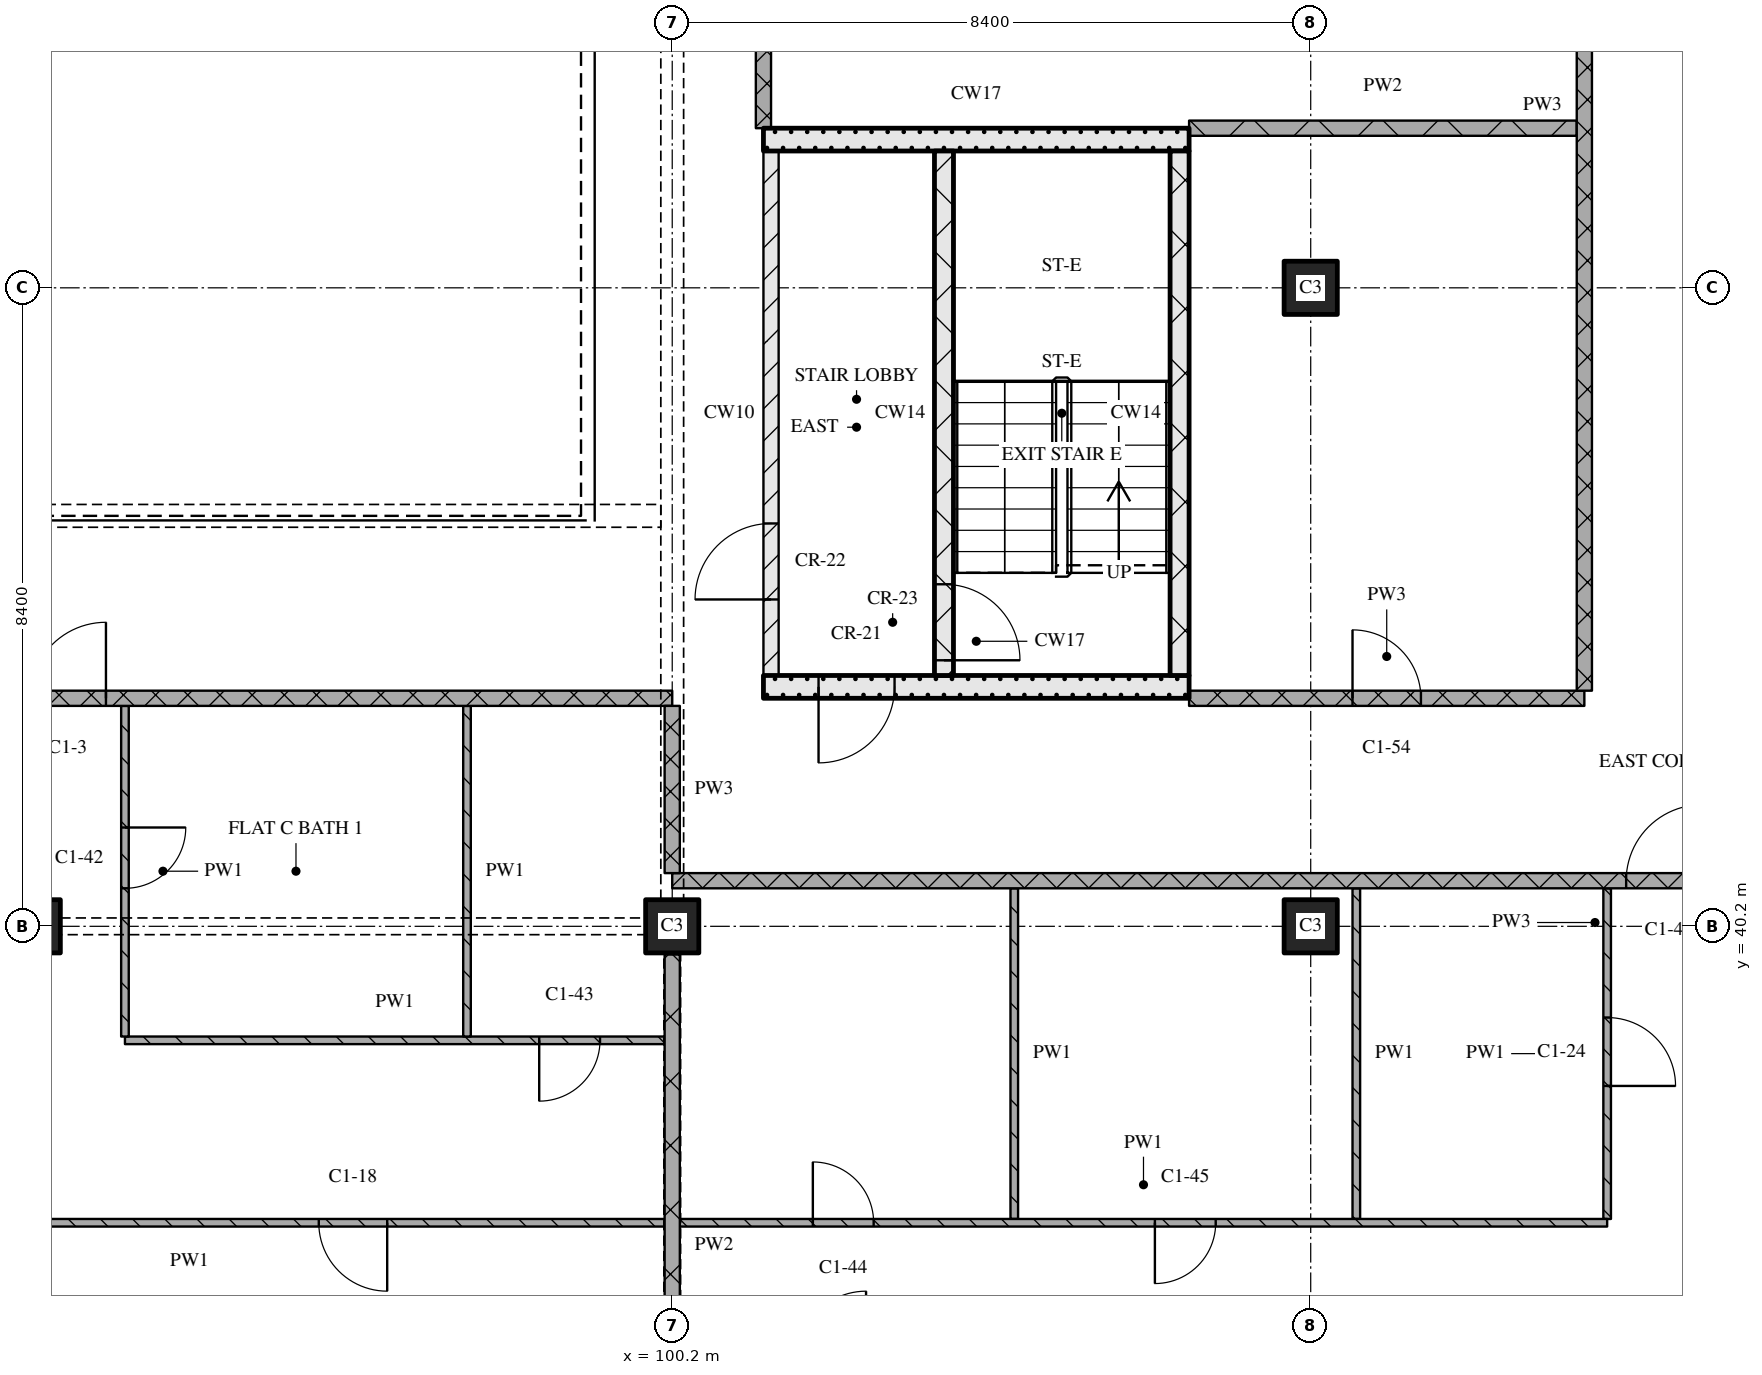
"""IFC4 building model, lengths in metres.
Left out: names, types, materials, properties, quantities, classifications, styles, units other than length and angle.
Written with IfcOpenShell. Run it as: python <this file> out.ifc"""

import sys

from ifc_helpers import new_model, si_unit, direction, frame, frame_2d, origin, origin_2d, place, context, subcontext, project, spatial, rectangle, extrude, element, fill, save


model = new_model("IFC4")
c1 = context("Model", 3, precision=1e-05, world=origin(), true_north=direction((0.0, 1.0)))
c2 = subcontext(c1, "Body", "Model", "MODEL_VIEW")
j1 = project(units=[si_unit("LENGTHUNIT", "METRE"), si_unit("PLANEANGLEUNIT", "RADIAN")], contexts=[c1])
p1 = place(None, origin())
s1 = spatial("IfcSite", under=j1, at=p1, CompositionType="ELEMENT")
p2 = place(p1, origin())
s2 = spatial("IfcBuilding", under=s1, at=p2, CompositionType="ELEMENT")
p3 = place(p2, frame((0.0, 0.0, 147.45)))
s3 = spatial("IfcBuildingStorey", under=s2, at=p3, CompositionType="ELEMENT", Elevation=147.45)
for number, where, z_axis, x_axis in (
    (1, (91.8, 40.2, 0.0), (0.0, 0.0, 1.0), (1.0, 0.0, 0.0)),
    (2, (100.2, 40.2, 0.0), (0.0, 0.0, 1.0), (1.0, 0.0, 0.0)),
    (3, (108.6, 40.2, 0.0), (0.0, 0.0, 1.0), (1.0, 0.0, 0.0)),
    (4, (108.6, 48.6, 0.0), (0.0, 0.0, 1.0), (1.0, 0.0, 0.0)),
):
    element("IfcColumn", number, at=place(p3, frame(where, z_axis=z_axis, x_axis=x_axis)), inside=s3, PredefinedType="COLUMN", context=c2, shape_type="SweptSolid", body=[
        extrude(rectangle(XDim=0.7, YDim=0.7, at=origin_2d()), origin(), (0.0, 0.0, 1.0), 3.6),
    ])
p4 = place(p3, frame((101.4, 43.35, 0.0), z_axis=(0.0, 0.0, 1.0), x_axis=(1.0, 0.0, 0.0)))
e5 = element("IfcWall", 5, at=p4, inside=s3, PredefinedType="SOLIDWALL", context=c2, shape_type="SweptSolid", body=[
    extrude(rectangle(XDim=5.6, YDim=0.3, at=frame_2d((2.8, 0.0))), origin(), (0.0, 0.0, 1.0), 3.32),
])
p5 = place(p4, frame((0.725, 0.0, 0.0)))
e6 = element("IfcOpeningElement", 6, at=p5, cuts=e5, PredefinedType="OPENING", context=c2, shape_type="SweptSolid", body=[
    extrude(rectangle(XDim=1.0, YDim=2.1, at=frame_2d((0.5, 1.05))), frame((0.0, 0.16, 0.0), z_axis=(0.0, -1.0, 0.0), x_axis=(1.0, 0.0, 0.0)), (0.0, 0.0, 1.0), 0.32),
])
p6 = place(p3, frame((101.5, 43.5, 0.0), z_axis=(0.0, 0.0, 1.0), x_axis=(0.0, 1.0, 0.0)))
e7 = element("IfcWall", 7, at=p6, inside=s3, PredefinedType="PARTITIONING", context=c2, shape_type="SweptSolid", body=[
    extrude(rectangle(XDim=6.9, YDim=0.2, at=frame_2d((3.45, 0.0))), origin(), (0.0, 0.0, 1.0), 3.32),
])
p7 = place(p6, frame((1.0, 0.0, 0.0)))
e8 = element("IfcOpeningElement", 8, at=p7, cuts=e7, PredefinedType="OPENING", context=c2, shape_type="SweptSolid", body=[
    extrude(rectangle(XDim=1.0, YDim=2.1, at=frame_2d((0.5, 1.05))), frame((0.0, 0.11, 0.0), z_axis=(0.0, -1.0, 0.0), x_axis=(1.0, 0.0, 0.0)), (0.0, 0.0, 1.0), 0.22),
])
p8 = place(p3, frame((103.775, 43.5, 0.0), z_axis=(0.0, 0.0, 1.0), x_axis=(0.0, 1.0, 0.0)))
e9 = element("IfcWall", 9, at=p8, inside=s3, PredefinedType="SOLIDWALL", context=c2, shape_type="SweptSolid", body=[
    extrude(rectangle(XDim=6.9, YDim=0.25, at=frame_2d((3.45, 0.0))), origin(), (0.0, 0.0, 1.0), 3.32),
])
p9 = place(p8, frame((0.2, 0.0, 0.0)))
e10 = element("IfcOpeningElement", 10, at=p9, cuts=e9, PredefinedType="OPENING", context=c2, shape_type="SweptSolid", body=[
    extrude(rectangle(XDim=1.0, YDim=2.1, at=frame_2d((0.5, 1.05))), frame((0.0, 0.135, 0.0), z_axis=(0.0, -1.0, 0.0), x_axis=(1.0, 0.0, 0.0)), (0.0, 0.0, 1.0), 0.27),
])
p10 = place(p3, frame((106.875, 43.5, 0.0), z_axis=(0.0, 0.0, 1.0), x_axis=(0.0, 1.0, 0.0)))
e11 = element("IfcWall", 11, at=p10, inside=s3, PredefinedType="SOLIDWALL", context=c2, shape_type="SweptSolid", body=[
    extrude(rectangle(XDim=6.9, YDim=0.25, at=frame_2d((3.45, 0.0))), origin(), (0.0, 0.0, 1.0), 3.32),
])
p11 = place(p3, frame((101.4, 50.55, 0.0), z_axis=(0.0, 0.0, 1.0), x_axis=(1.0, 0.0, 0.0)))
e12 = element("IfcWall", 12, at=p11, inside=s3, PredefinedType="SOLIDWALL", context=c2, shape_type="SweptSolid", body=[
    extrude(rectangle(XDim=5.6, YDim=0.3, at=frame_2d((2.8, 0.0))), origin(), (0.0, 0.0, 1.0), 3.32),
])
p12 = place(p3, frame((93.0, 38.7, 0.0), z_axis=(0.0, 0.0, 1.0), x_axis=(1.0, 0.0, 0.0)))
e13 = element("IfcWall", 13, at=p12, inside=s3, PredefinedType="PARTITIONING", context=c2, shape_type="SweptSolid", body=[
    extrude(rectangle(XDim=7.1, YDim=0.1, at=frame_2d((3.55, 0.0))), origin(), (0.0, 0.0, 1.0), 3.32),
])
p13 = place(p12, frame((5.45, 0.0, 0.0)))
e14 = element("IfcOpeningElement", 14, at=p13, cuts=e13, PredefinedType="OPENING", context=c2, shape_type="SweptSolid", body=[
    extrude(rectangle(XDim=0.8, YDim=2.1, at=frame_2d((0.4, 1.05))), frame((0.0, 0.06, 0.0), z_axis=(0.0, -1.0, 0.0), x_axis=(1.0, 0.0, 0.0)), (0.0, 0.0, 1.0), 0.12),
])
p14 = place(p3, frame((124.48, 40.8, 0.0), z_axis=(0.0, 0.0, 1.0), x_axis=(-1.0, 0.0, 0.0)))
e15 = element("IfcWall", 15, at=p14, inside=s3, PredefinedType="PARTITIONING", context=c2, shape_type="SweptSolid", body=[
    extrude(rectangle(XDim=24.28, YDim=0.2, at=frame_2d((12.14, 0.0))), origin(), (0.0, 0.0, 1.0), 3.32),
])
p15 = place(p14, frame((10.73, 0.0, 0.0)))
e16 = element("IfcOpeningElement", 16, at=p15, cuts=e15, PredefinedType="OPENING", context=c2, shape_type="SweptSolid", body=[
    extrude(rectangle(XDim=1.0, YDim=2.1, at=frame_2d((0.5, 1.05))), frame((0.0, 0.11, 0.0), z_axis=(0.0, -1.0, 0.0), x_axis=(1.0, 0.0, 0.0)), (0.0, 0.0, 1.0), 0.22),
])
p16 = place(p3, frame((100.2, 43.2, 0.0), z_axis=(0.0, 0.0, 1.0), x_axis=(-1.0, 0.0, 0.0)))
e17 = element("IfcWall", 17, at=p16, inside=s3, PredefinedType="PARTITIONING", context=c2, shape_type="SweptSolid", body=[
    extrude(rectangle(XDim=25.2, YDim=0.2, at=frame_2d((12.6, 0.0))), origin(), (0.0, 0.0, 1.0), 3.32),
])
p17 = place(p16, frame((7.45, 0.0, 0.0)))
e18 = element("IfcOpeningElement", 18, at=p17, cuts=e17, PredefinedType="OPENING", context=c2, shape_type="SweptSolid", body=[
    extrude(rectangle(XDim=1.0, YDim=2.1, at=frame_2d((0.5, 1.05))), frame((0.0, 0.11, 0.0), z_axis=(0.0, -1.0, 0.0), x_axis=(1.0, 0.0, 0.0)), (0.0, 0.0, 1.0), 0.22),
])
p18 = place(p16, frame((20.95, 0.0, 0.0)))
e19 = element("IfcOpeningElement", 19, at=p18, cuts=e17, PredefinedType="OPENING", context=c2, shape_type="SweptSolid", body=[
    extrude(rectangle(XDim=1.0, YDim=2.1, at=frame_2d((0.5, 1.05))), frame((0.0, 0.11, 0.0), z_axis=(0.0, -1.0, 0.0), x_axis=(1.0, 0.0, 0.0)), (0.0, 0.0, 1.0), 0.22),
])
p19 = place(p3, frame((107.0, 43.2, 0.0), z_axis=(0.0, 0.0, 1.0), x_axis=(1.0, 0.0, 0.0)))
e20 = element("IfcWall", 20, at=p19, inside=s3, PredefinedType="PARTITIONING", context=c2, shape_type="SweptSolid", body=[
    extrude(rectangle(XDim=5.2, YDim=0.2, at=frame_2d((2.6, 0.0))), origin(), (0.0, 0.0, 1.0), 3.32),
])
p20 = place(p19, frame((2.15, 0.0, 0.0)))
e21 = element("IfcOpeningElement", 21, at=p20, cuts=e20, PredefinedType="OPENING", context=c2, shape_type="SweptSolid", body=[
    extrude(rectangle(XDim=0.9, YDim=2.1, at=frame_2d((0.45, 1.05))), frame((0.0, 0.11, 0.0), z_axis=(0.0, -1.0, 0.0), x_axis=(1.0, 0.0, 0.0)), (0.0, 0.0, 1.0), 0.22),
])
p21 = place(p3, frame((107.0, 50.7, 0.0), z_axis=(0.0, 0.0, 1.0), x_axis=(1.0, 0.0, 0.0)))
e22 = element("IfcWall", 22, at=p21, inside=s3, PredefinedType="PARTITIONING", context=c2, shape_type="SweptSolid", body=[
    extrude(rectangle(XDim=5.1, YDim=0.2, at=frame_2d((2.55, 0.0))), origin(), (0.0, 0.0, 1.0), 3.32),
])
p22 = place(p3, frame((93.0, 43.1, 0.0), z_axis=(0.0, 0.0, 1.0), x_axis=(0.0, -1.0, 0.0)))
e23 = element("IfcWall", 23, at=p22, inside=s3, PredefinedType="PARTITIONING", context=c2, shape_type="SweptSolid", body=[
    extrude(rectangle(XDim=4.35, YDim=0.1, at=frame_2d((2.175, 0.0))), origin(), (0.0, 0.0, 1.0), 3.32),
])
p23 = place(p22, frame((1.6, 0.0, 0.0)))
e24 = element("IfcOpeningElement", 24, at=p23, cuts=e23, PredefinedType="OPENING", context=c2, shape_type="SweptSolid", body=[
    extrude(rectangle(XDim=0.8, YDim=2.1, at=frame_2d((0.4, 1.05))), frame((0.0, 0.06, 0.0), z_axis=(0.0, -1.0, 0.0), x_axis=(1.0, 0.0, 0.0)), (0.0, 0.0, 1.0), 0.12),
])
p24 = place(p3, frame((97.5, 43.1, 0.0), z_axis=(0.0, 0.0, 1.0), x_axis=(0.0, -1.0, 0.0)))
e25 = element("IfcWall", 25, at=p24, inside=s3, PredefinedType="PARTITIONING", context=c2, shape_type="SweptSolid", body=[
    extrude(rectangle(XDim=4.35, YDim=0.1, at=frame_2d((2.175, 0.0))), origin(), (0.0, 0.0, 1.0), 3.32),
])
p25 = place(p3, frame((100.2, 43.1, 0.0), z_axis=(0.0, 0.0, 1.0), x_axis=(0.0, -1.0, 0.0)))
e26 = element("IfcWall", 26, at=p25, inside=s3, PredefinedType="PARTITIONING", context=c2, shape_type="SweptSolid", body=[
    extrude(rectangle(XDim=2.2, YDim=0.2, at=frame_2d((1.1, 0.0))), origin(), (0.0, 0.0, 1.0), 2.43),
])
p26 = place(p3, frame((100.2, 39.83, 0.0), z_axis=(0.0, 0.0, 1.0), x_axis=(0.0, -1.0, 0.0)))
e27 = element("IfcWall", 27, at=p26, inside=s3, PredefinedType="PARTITIONING", context=c2, shape_type="SweptSolid", body=[
    extrude(rectangle(XDim=7.66, YDim=0.2, at=frame_2d((3.83, 0.0))), origin(), (0.0, 0.0, 1.0), 2.72),
])
p27 = place(p3, frame((101.4, 58.7, 0.0), z_axis=(0.0, 0.0, 1.0), x_axis=(0.0, -1.0, 0.0)))
e28 = element("IfcWall", 28, at=p27, inside=s3, PredefinedType="PARTITIONING", context=c2, shape_type="SweptSolid", body=[
    extrude(rectangle(XDim=8.0, YDim=0.2, at=frame_2d((4.0, 0.0))), origin(), (0.0, 0.0, 1.0), 3.32),
])
p28 = place(p27, frame((1.225, 0.0, 0.9)))
e29 = element("IfcOpeningElement", 29, at=p28, cuts=e28, PredefinedType="OPENING", context=c2, shape_type="SweptSolid", body=[
    extrude(rectangle(XDim=1.5, YDim=1.5, at=frame_2d((0.75, 0.75))), frame((0.0, 0.11, 0.0), z_axis=(0.0, -1.0, 0.0), x_axis=(1.0, 0.0, 0.0)), (0.0, 0.0, 1.0), 0.22),
])
for number, where, z_axis, x_axis in (
    (30, (104.7, 40.7, 0.0), (0.0, 0.0, 1.0), (0.0, -1.0, 0.0)),
    (31, (109.2, 40.7, 0.0), (0.0, 0.0, 1.0), (0.0, -1.0, 0.0)),
):
    element("IfcWall", number, at=place(p3, frame(where, z_axis=z_axis, x_axis=x_axis)), inside=s3, PredefinedType="PARTITIONING", context=c2, shape_type="SweptSolid", body=[
        extrude(rectangle(XDim=4.35, YDim=0.1, at=frame_2d((2.175, 0.0))), origin(), (0.0, 0.0, 1.0), 3.32),
    ])
p29 = place(p3, frame((112.2, 43.3, 0.0), z_axis=(0.0, 0.0, 1.0), x_axis=(0.0, 1.0, 0.0)))
e32 = element("IfcWall", 32, at=p29, inside=s3, PredefinedType="PARTITIONING", context=c2, shape_type="SweptSolid", body=[
    extrude(rectangle(XDim=15.4, YDim=0.2, at=frame_2d((7.7, 0.0))), origin(), (0.0, 0.0, 1.0), 3.32),
])
p30 = place(p29, frame((11.85, 0.0, 0.0)))
e33 = element("IfcOpeningElement", 33, at=p30, cuts=e32, PredefinedType="OPENING", context=c2, shape_type="SweptSolid", body=[
    extrude(rectangle(XDim=1.0, YDim=2.1, at=frame_2d((0.5, 1.05))), frame((0.0, 0.11, 0.0), z_axis=(0.0, -1.0, 0.0), x_axis=(1.0, 0.0, 0.0)), (0.0, 0.0, 1.0), 0.22),
])
p31 = place(p3, frame((112.5, 36.35, 0.0), z_axis=(0.0, 0.0, 1.0), x_axis=(0.0, 1.0, 0.0)))
e34 = element("IfcWall", 34, at=p31, inside=s3, PredefinedType="PARTITIONING", context=c2, shape_type="SweptSolid", body=[
    extrude(rectangle(XDim=4.35, YDim=0.1, at=frame_2d((2.175, 0.0))), origin(), (0.0, 0.0, 1.0), 3.32),
])
p32 = place(p31, frame((1.75, 0.0, 0.0)))
e35 = element("IfcOpeningElement", 35, at=p32, cuts=e34, PredefinedType="OPENING", context=c2, shape_type="SweptSolid", body=[
    extrude(rectangle(XDim=0.9, YDim=2.1, at=frame_2d((0.45, 1.05))), frame((0.0, 0.06, 0.0), z_axis=(0.0, -1.0, 0.0), x_axis=(1.0, 0.0, 0.0)), (0.0, 0.0, 1.0), 0.12),
])
p33 = place(p3, frame((100.1, 36.3, 0.0), z_axis=(0.0, 0.0, 1.0), x_axis=(-1.0, 0.0, 0.0)))
e36 = element("IfcWall", 36, at=p33, inside=s3, PredefinedType="PARTITIONING", context=c2, shape_type="SweptSolid", body=[
    extrude(rectangle(XDim=12.5, YDim=0.1, at=frame_2d((6.25, 0.0))), origin(), (0.0, 0.0, 1.0), 3.32),
])
p34 = place(p33, frame((3.65, 0.0, 0.0)))
e37 = element("IfcOpeningElement", 37, at=p34, cuts=e36, PredefinedType="OPENING", context=c2, shape_type="SweptSolid", body=[
    extrude(rectangle(XDim=0.9, YDim=2.1, at=frame_2d((0.45, 1.05))), frame((0.0, 0.06, 0.0), z_axis=(0.0, -1.0, 0.0), x_axis=(1.0, 0.0, 0.0)), (0.0, 0.0, 1.0), 0.12),
])
p35 = place(p33, frame((9.95, 0.0, 0.0)))
e38 = element("IfcOpeningElement", 38, at=p35, cuts=e36, PredefinedType="OPENING", context=c2, shape_type="SweptSolid", body=[
    extrude(rectangle(XDim=0.9, YDim=2.1, at=frame_2d((0.45, 1.05))), frame((0.0, 0.06, 0.0), z_axis=(0.0, -1.0, 0.0), x_axis=(1.0, 0.0, 0.0)), (0.0, 0.0, 1.0), 0.12),
])
p36 = place(p3, frame((100.3, 36.3, 0.0), z_axis=(0.0, 0.0, 1.0), x_axis=(1.0, 0.0, 0.0)))
e39 = element("IfcWall", 39, at=p36, inside=s3, PredefinedType="PARTITIONING", context=c2, shape_type="SweptSolid", body=[
    extrude(rectangle(XDim=12.2, YDim=0.1, at=frame_2d((6.1, 0.0))), origin(), (0.0, 0.0, 1.0), 3.32),
])
p37 = place(p36, frame((1.75, 0.0, 0.0)))
e40 = element("IfcOpeningElement", 40, at=p37, cuts=e39, PredefinedType="OPENING", context=c2, shape_type="SweptSolid", body=[
    extrude(rectangle(XDim=0.8, YDim=2.1, at=frame_2d((0.4, 1.05))), frame((0.0, 0.06, 0.0), z_axis=(0.0, -1.0, 0.0), x_axis=(1.0, 0.0, 0.0)), (0.0, 0.0, 1.0), 0.12),
])
p38 = place(p36, frame((6.25, 0.0, 0.0)))
e41 = element("IfcOpeningElement", 41, at=p38, cuts=e39, PredefinedType="OPENING", context=c2, shape_type="SweptSolid", body=[
    extrude(rectangle(XDim=0.8, YDim=2.1, at=frame_2d((0.4, 1.05))), frame((0.0, 0.06, 0.0), z_axis=(0.0, -1.0, 0.0), x_axis=(1.0, 0.0, 0.0)), (0.0, 0.0, 1.0), 0.12),
])
p39 = place(p5, origin())
e42 = element("IfcDoor", 42, at=p39, inside=s3, OperationType="SINGLE_SWING_RIGHT", PredefinedType="DOOR", context=c2, shape_type="SweptSolid", body=[
    extrude(rectangle(XDim=1.0, YDim=2.1, at=frame_2d((0.5, 1.05))), frame((0.0, 0.025, 0.0), z_axis=(0.0, -1.0, 0.0), x_axis=(1.0, 0.0, 0.0)), (0.0, 0.0, 1.0), 0.05),
])
fill(e6, e42)
p40 = place(p9, origin())
e43 = element("IfcDoor", 43, at=p40, inside=s3, OperationType="SINGLE_SWING_RIGHT", PredefinedType="DOOR", context=c2, shape_type="SweptSolid", body=[
    extrude(rectangle(XDim=1.0, YDim=2.1, at=frame_2d((0.5, 1.05))), frame((0.0, 0.025, 0.0), z_axis=(0.0, -1.0, 0.0), x_axis=(1.0, 0.0, 0.0)), (0.0, 0.0, 1.0), 0.05),
])
fill(e10, e43)
p41 = place(p7, origin())
e44 = element("IfcDoor", 44, at=p41, inside=s3, OperationType="SINGLE_SWING_LEFT", PredefinedType="DOOR", context=c2, shape_type="SweptSolid", body=[
    extrude(rectangle(XDim=1.0, YDim=2.1, at=frame_2d((0.5, 1.05))), frame((0.0, 0.025, 0.0), z_axis=(0.0, -1.0, 0.0), x_axis=(1.0, 0.0, 0.0)), (0.0, 0.0, 1.0), 0.05),
])
fill(e8, e44)
p42 = place(p13, origin())
e45 = element("IfcDoor", 45, at=p42, inside=s3, OperationType="SINGLE_SWING_RIGHT", PredefinedType="DOOR", context=c2, shape_type="SweptSolid", body=[
    extrude(rectangle(XDim=0.8, YDim=2.1, at=frame_2d((0.4, 1.05))), frame((0.0, 0.025, 0.0), z_axis=(0.0, -1.0, 0.0), x_axis=(1.0, 0.0, 0.0)), (0.0, 0.0, 1.0), 0.05),
])
fill(e14, e45)
p43 = place(p15, origin())
e46 = element("IfcDoor", 46, at=p43, inside=s3, OperationType="SINGLE_SWING_RIGHT", PredefinedType="DOOR", context=c2, shape_type="SweptSolid", body=[
    extrude(rectangle(XDim=1.0, YDim=2.1, at=frame_2d((0.5, 1.05))), frame((0.0, 0.025, 0.0), z_axis=(0.0, -1.0, 0.0), x_axis=(1.0, 0.0, 0.0)), (0.0, 0.0, 1.0), 0.05),
])
fill(e16, e46)
p44 = place(p17, origin())
e47 = element("IfcDoor", 47, at=p44, inside=s3, OperationType="SINGLE_SWING_RIGHT", PredefinedType="DOOR", context=c2, shape_type="SweptSolid", body=[
    extrude(rectangle(XDim=1.0, YDim=2.1, at=frame_2d((0.5, 1.05))), frame((0.0, 0.025, 0.0), z_axis=(0.0, -1.0, 0.0), x_axis=(1.0, 0.0, 0.0)), (0.0, 0.0, 1.0), 0.05),
])
fill(e18, e47)
p45 = place(p20, origin())
e48 = element("IfcDoor", 48, at=p45, inside=s3, OperationType="SINGLE_SWING_LEFT", PredefinedType="DOOR", context=c2, shape_type="SweptSolid", body=[
    extrude(rectangle(XDim=0.9, YDim=2.1, at=frame_2d((0.45, 1.05))), frame((0.0, 0.025, 0.0), z_axis=(0.0, -1.0, 0.0), x_axis=(1.0, 0.0, 0.0)), (0.0, 0.0, 1.0), 0.05),
])
fill(e21, e48)
p46 = place(p23, origin())
e49 = element("IfcDoor", 49, at=p46, inside=s3, OperationType="SINGLE_SWING_LEFT", PredefinedType="DOOR", context=c2, shape_type="SweptSolid", body=[
    extrude(rectangle(XDim=0.8, YDim=2.1, at=frame_2d((0.4, 1.05))), frame((0.0, 0.025, 0.0), z_axis=(0.0, -1.0, 0.0), x_axis=(1.0, 0.0, 0.0)), (0.0, 0.0, 1.0), 0.05),
])
fill(e24, e49)
p47 = place(p32, origin())
e50 = element("IfcDoor", 50, at=p47, inside=s3, OperationType="SINGLE_SWING_RIGHT", PredefinedType="DOOR", context=c2, shape_type="SweptSolid", body=[
    extrude(rectangle(XDim=0.9, YDim=2.1, at=frame_2d((0.45, 1.05))), frame((0.0, 0.025, 0.0), z_axis=(0.0, -1.0, 0.0), x_axis=(1.0, 0.0, 0.0)), (0.0, 0.0, 1.0), 0.05),
])
fill(e35, e50)
p48 = place(p34, origin())
e51 = element("IfcDoor", 51, at=p48, inside=s3, OperationType="SINGLE_SWING_LEFT", PredefinedType="DOOR", context=c2, shape_type="SweptSolid", body=[
    extrude(rectangle(XDim=0.9, YDim=2.1, at=frame_2d((0.45, 1.05))), frame((0.0, 0.025, 0.0), z_axis=(0.0, -1.0, 0.0), x_axis=(1.0, 0.0, 0.0)), (0.0, 0.0, 1.0), 0.05),
])
fill(e37, e51)
p49 = place(p37, origin())
e52 = element("IfcDoor", 52, at=p49, inside=s3, OperationType="SINGLE_SWING_LEFT", PredefinedType="DOOR", context=c2, shape_type="SweptSolid", body=[
    extrude(rectangle(XDim=0.8, YDim=2.1, at=frame_2d((0.4, 1.05))), frame((0.0, 0.025, 0.0), z_axis=(0.0, -1.0, 0.0), x_axis=(1.0, 0.0, 0.0)), (0.0, 0.0, 1.0), 0.05),
])
fill(e40, e52)
p50 = place(p38, origin())
e53 = element("IfcDoor", 53, at=p50, inside=s3, OperationType="SINGLE_SWING_RIGHT", PredefinedType="DOOR", context=c2, shape_type="SweptSolid", body=[
    extrude(rectangle(XDim=0.8, YDim=2.1, at=frame_2d((0.4, 1.05))), frame((0.0, 0.025, 0.0), z_axis=(0.0, -1.0, 0.0), x_axis=(1.0, 0.0, 0.0)), (0.0, 0.0, 1.0), 0.05),
])
fill(e41, e53)
save(model, sys.argv[1])
